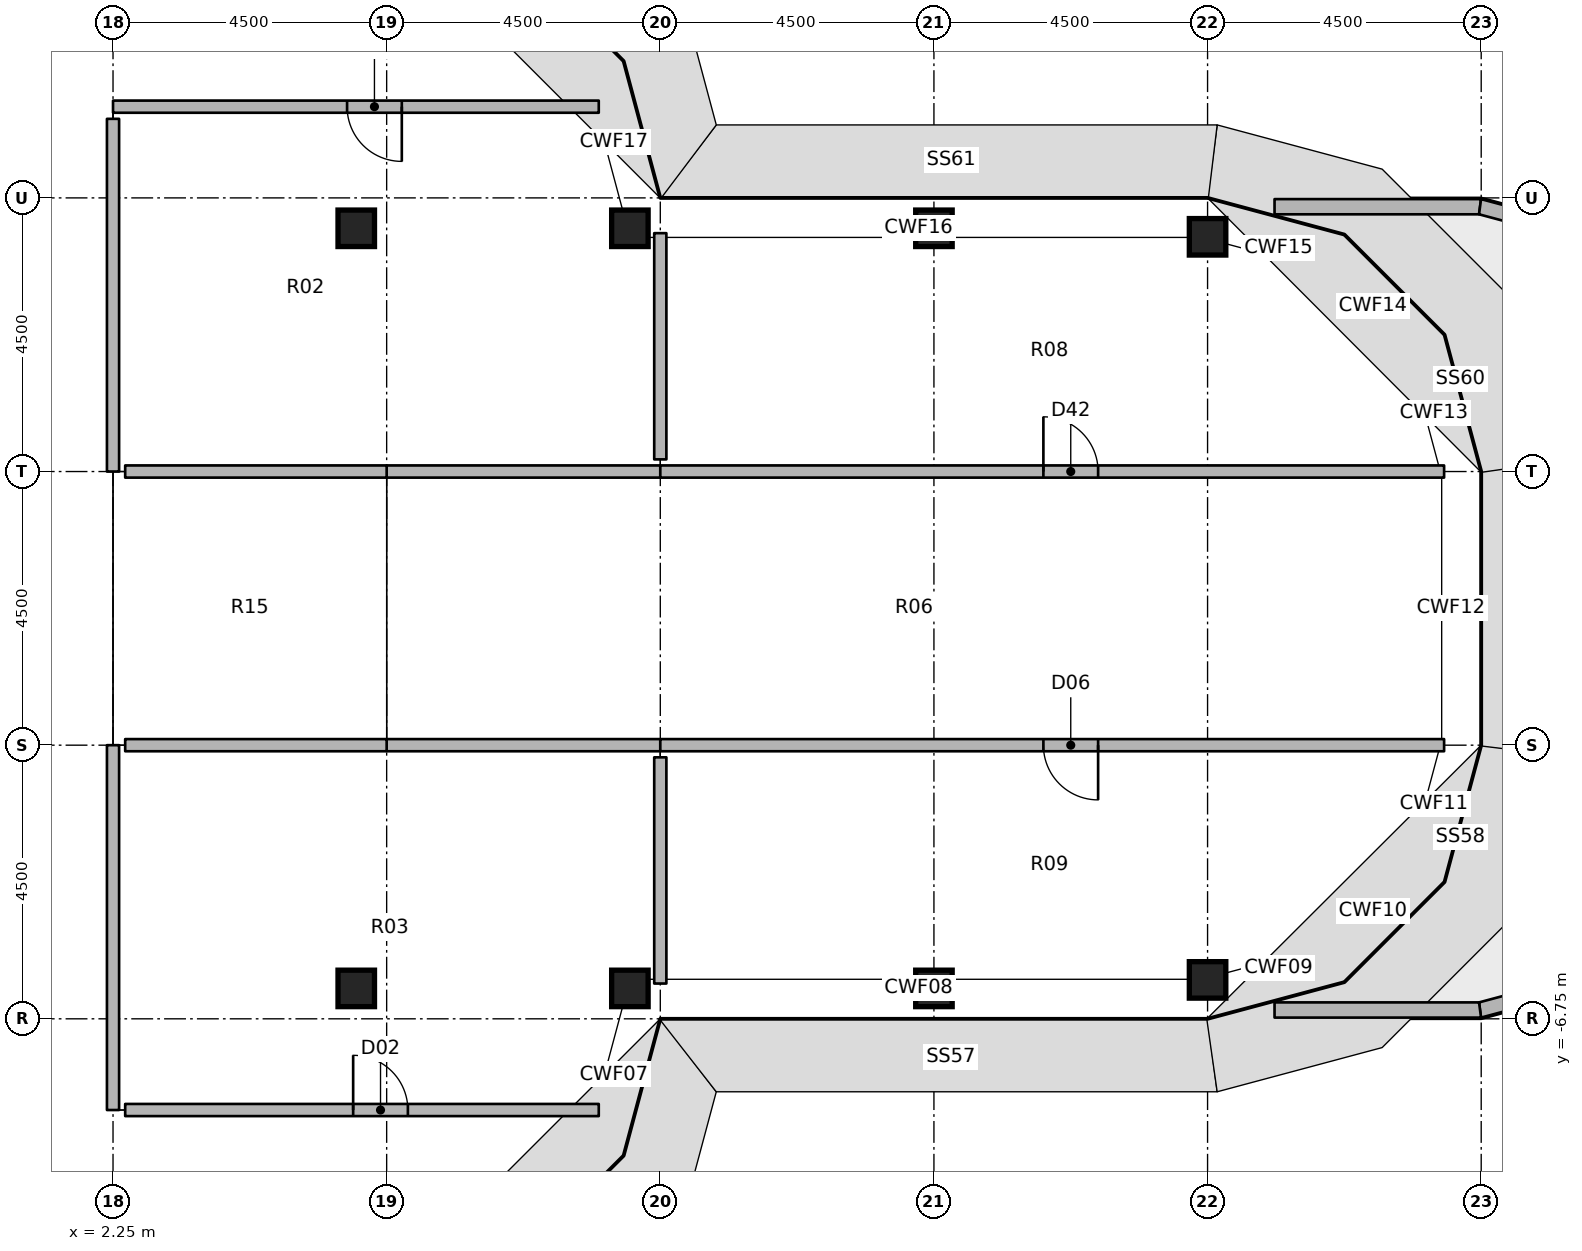
"""IFC4 building model, lengths in metres.
Left out: names, types, materials, properties, quantities, classifications, styles, units other than length and angle.
Written with IfcOpenShell. Run it as: python <this file> out.ifc"""

import sys

from ifc_helpers import new_model, si_unit, direction, frame, frame_2d, origin, origin_2d, place, context, subcontext, project, spatial, polyline, rectangle, outline, extrude, element, fill, save


model = new_model("IFC4")
c1 = context("Model", 3, precision=1e-05, world=origin(), true_north=direction((0.0, 1.0)))
c2 = subcontext(c1, "Body", "Model", "MODEL_VIEW")
j1 = project(units=[si_unit("LENGTHUNIT", "METRE"), si_unit("PLANEANGLEUNIT", "RADIAN")], contexts=[c1])
p1 = place(None, origin())
s1 = spatial("IfcSite", under=j1, at=p1, CompositionType="ELEMENT")
p2 = place(p1, origin())
s2 = spatial("IfcBuilding", under=s1, at=p2, CompositionType="ELEMENT")
p3 = place(p2, frame((0.0, 0.0, 291.6)))
s3 = spatial("IfcBuildingStorey", under=s2, at=p3, CompositionType="ELEMENT", Elevation=291.6)
for number, where, z_axis, x_axis in (
    (1, (6.25, -6.25, 0.0), (0.0, 0.0, 1.0), (1.0, 0.0, 0.0)),
    (2, (6.25, 6.25, 0.0), (0.0, 0.0, 1.0), (1.0, 0.0, 0.0)),
    (3, (10.75, -6.25, 0.0), (0.0, 0.0, 1.0), (1.0, 0.0, 0.0)),
    (4, (10.75, 6.25, 0.0), (0.0, 0.0, 1.0), (1.0, 0.0, 0.0)),
    (5, (15.75, -6.25, 0.0), (0.0, 0.0, 1.0), (1.0, 0.0, 0.0)),
    (6, (15.75, 6.25, 0.0), (0.0, 0.0, 1.0), (1.0, 0.0, 0.0)),
    (7, (20.25, -6.11, 0.0), (0.0, 0.0, 1.0), (1.0, 0.0, 0.0)),
    (8, (20.25, 6.11, 0.0), (0.0, 0.0, 1.0), (1.0, 0.0, 0.0)),
):
    element("IfcColumn", number, at=place(p3, frame(where, z_axis=z_axis, x_axis=x_axis)), inside=s3, PredefinedType="COLUMN", context=c2, shape_type="SweptSolid", body=[
        extrude(rectangle(XDim=0.6, YDim=0.6, at=origin_2d()), origin(), (0.0, 0.0, 1.0), 3.45),
    ])
p4 = place(p3, origin())
e9 = element("IfcWall", 9, at=p4, inside=s3, PredefinedType="PARAPET", context=c2, shape_type="SweptSolid", body=[
    extrude(outline(polyline([(21.351, 6.73), (24.747, 6.73), (24.715, 6.48), (21.351, 6.48), (21.351, 6.73)])), origin(), (0.0, 0.0, 1.0), 1.22),
])
p5 = place(p3, origin())
e10 = element("IfcWall", 10, at=p5, inside=s3, PredefinedType="PARAPET", context=c2, shape_type="SweptSolid", body=[
    extrude(outline(polyline([(24.747, 6.73), (26.99, 6.129), (26.86, 5.905), (24.715, 6.48), (24.747, 6.73)])), origin(), (0.0, 0.0, 1.0), 1.22),
])
p6 = place(p3, origin())
e11 = element("IfcWall", 11, at=p6, inside=s3, PredefinedType="PARAPET", context=c2, shape_type="SweptSolid", body=[
    extrude(outline(polyline([(26.99, -6.129), (24.747, -6.73), (24.715, -6.48), (26.86, -5.905), (26.99, -6.129)])), origin(), (0.0, 0.0, 1.0), 1.22),
])
p7 = place(p3, origin())
e12 = element("IfcWall", 12, at=p7, inside=s3, PredefinedType="PARAPET", context=c2, shape_type="SweptSolid", body=[
    extrude(outline(polyline([(24.747, -6.73), (21.351, -6.73), (21.351, -6.48), (24.715, -6.48), (24.747, -6.73)])), origin(), (0.0, 0.0, 1.0), 1.22),
])
p8 = place(p3, frame((10.238, 8.25, 0.0), z_axis=(0.0, 0.0, 1.0), x_axis=(-1.0, 0.0, 0.0)))
e13 = element("IfcWall", 13, at=p8, inside=s3, PredefinedType="PARTITIONING", context=c2, shape_type="SweptSolid", body=[
    extrude(rectangle(XDim=7.988, YDim=0.2, at=frame_2d((3.994, 0.0))), origin(), (0.0, 0.0, 1.0), 3.45),
])
p9 = place(p8, frame((3.239, 0.0, 0.0)))
e14 = element("IfcOpeningElement", 14, at=p9, cuts=e13, PredefinedType="OPENING", context=c2, shape_type="SweptSolid", body=[
    extrude(rectangle(XDim=0.9, YDim=2.1, at=frame_2d((0.45, 1.05))), frame((0.0, 0.11, 0.0), z_axis=(0.0, -1.0, 0.0), x_axis=(1.0, 0.0, 0.0)), (0.0, 0.0, 1.0), 0.22),
])
p10 = place(p3, frame((2.25, 8.05, 0.0), z_axis=(0.0, 0.0, 1.0), x_axis=(0.0, -1.0, 0.0)))
e15 = element("IfcWall", 15, at=p10, inside=s3, PredefinedType="PARTITIONING", context=c2, shape_type="SweptSolid", body=[
    extrude(rectangle(XDim=5.8, YDim=0.2, at=frame_2d((2.9, 0.0))), origin(), (0.0, 0.0, 1.0), 2.681),
])
p11 = place(p3, frame((2.25, -2.25, 0.0), z_axis=(0.0, 0.0, 1.0), x_axis=(0.0, -1.0, 0.0)))
e16 = element("IfcWall", 16, at=p11, inside=s3, PredefinedType="PARTITIONING", context=c2, shape_type="SweptSolid", body=[
    extrude(rectangle(XDim=6.0, YDim=0.2, at=frame_2d((3.0, 0.0))), origin(), (0.0, 0.0, 1.0), 2.681),
])
p12 = place(p3, frame((2.45, -8.25, 0.0), z_axis=(0.0, 0.0, 1.0), x_axis=(1.0, 0.0, 0.0)))
e17 = element("IfcWall", 17, at=p12, inside=s3, PredefinedType="PARTITIONING", context=c2, shape_type="SweptSolid", body=[
    extrude(rectangle(XDim=7.788, YDim=0.2, at=frame_2d((3.894, 0.0))), origin(), (0.0, 0.0, 1.0), 3.45),
])
p13 = place(p12, frame((3.749, 0.0, 0.0)))
e18 = element("IfcOpeningElement", 18, at=p13, cuts=e17, PredefinedType="OPENING", context=c2, shape_type="SweptSolid", body=[
    extrude(rectangle(XDim=0.9, YDim=2.1, at=frame_2d((0.45, 1.05))), frame((0.0, 0.11, 0.0), z_axis=(0.0, -1.0, 0.0), x_axis=(1.0, 0.0, 0.0)), (0.0, 0.0, 1.0), 0.22),
])
p14 = place(p3, frame((11.25, 2.25, 0.0), z_axis=(0.0, 0.0, 1.0), x_axis=(-1.0, 0.0, 0.0)))
e19 = element("IfcWall", 19, at=p14, inside=s3, PredefinedType="PARTITIONING", context=c2, shape_type="SweptSolid", body=[
    extrude(rectangle(XDim=4.5, YDim=0.2, at=frame_2d((2.25, 0.0))), origin(), (0.0, 0.0, 1.0), 2.828),
])
p15 = place(p3, frame((11.25, 6.17, 0.0), z_axis=(0.0, 0.0, 1.0), x_axis=(0.0, -1.0, 0.0)))
e20 = element("IfcWall", 20, at=p15, inside=s3, PredefinedType="PARTITIONING", context=c2, shape_type="SweptSolid", body=[
    extrude(rectangle(XDim=3.72, YDim=0.2, at=frame_2d((1.86, 0.0))), origin(), (0.0, 0.0, 1.0), 3.45),
])
p16 = place(p3, frame((6.75, 2.25, 0.0), z_axis=(0.0, 0.0, 1.0), x_axis=(-1.0, 0.0, 0.0)))
e21 = element("IfcWall", 21, at=p16, inside=s3, PredefinedType="PARTITIONING", context=c2, shape_type="SweptSolid", body=[
    extrude(rectangle(XDim=4.3, YDim=0.2, at=frame_2d((2.15, 0.0))), origin(), (0.0, 0.0, 1.0), 2.828),
])
p17 = place(p3, frame((6.75, -2.25, 0.0), z_axis=(0.0, 0.0, 1.0), x_axis=(1.0, 0.0, 0.0)))
e22 = element("IfcWall", 22, at=p17, inside=s3, PredefinedType="PARTITIONING", context=c2, shape_type="SweptSolid", body=[
    extrude(rectangle(XDim=4.5, YDim=0.2, at=frame_2d((2.25, 0.0))), origin(), (0.0, 0.0, 1.0), 2.828),
])
p18 = place(p3, frame((11.25, -2.45, 0.0), z_axis=(0.0, 0.0, 1.0), x_axis=(0.0, -1.0, 0.0)))
e23 = element("IfcWall", 23, at=p18, inside=s3, PredefinedType="PARTITIONING", context=c2, shape_type="SweptSolid", body=[
    extrude(rectangle(XDim=3.72, YDim=0.2, at=frame_2d((1.86, 0.0))), origin(), (0.0, 0.0, 1.0), 3.45),
])
p19 = place(p3, frame((2.45, -2.25, 0.0), z_axis=(0.0, 0.0, 1.0), x_axis=(1.0, 0.0, 0.0)))
e24 = element("IfcWall", 24, at=p19, inside=s3, PredefinedType="PARTITIONING", context=c2, shape_type="SweptSolid", body=[
    extrude(rectangle(XDim=4.3, YDim=0.2, at=frame_2d((2.15, 0.0))), origin(), (0.0, 0.0, 1.0), 2.828),
])
p20 = place(p3, frame((11.25, 2.25, 0.0), z_axis=(0.0, 0.0, 1.0), x_axis=(1.0, 0.0, 0.0)))
e25 = element("IfcWall", 25, at=p20, inside=s3, PredefinedType="PARTITIONING", context=c2, shape_type="SweptSolid", body=[
    extrude(rectangle(XDim=12.89, YDim=0.2, at=frame_2d((6.445, 0.0))), origin(), (0.0, 0.0, 1.0), 2.53),
])
p21 = place(p20, frame((6.3, 0.0, 0.0)))
e26 = element("IfcOpeningElement", 26, at=p21, cuts=e25, PredefinedType="OPENING", context=c2, shape_type="SweptSolid", body=[
    extrude(rectangle(XDim=0.9, YDim=2.1, at=frame_2d((0.45, 1.05))), frame((0.0, 0.11, 0.0), z_axis=(0.0, -1.0, 0.0), x_axis=(1.0, 0.0, 0.0)), (0.0, 0.0, 1.0), 0.22),
])
p22 = place(p3, frame((24.14, -2.25, 0.0), z_axis=(0.0, 0.0, 1.0), x_axis=(-1.0, 0.0, 0.0)))
e27 = element("IfcWall", 27, at=p22, inside=s3, PredefinedType="PARTITIONING", context=c2, shape_type="SweptSolid", body=[
    extrude(rectangle(XDim=12.89, YDim=0.2, at=frame_2d((6.445, 0.0))), origin(), (0.0, 0.0, 1.0), 2.53),
])
p23 = place(p22, frame((5.69, 0.0, 0.0)))
e28 = element("IfcOpeningElement", 28, at=p23, cuts=e27, PredefinedType="OPENING", context=c2, shape_type="SweptSolid", body=[
    extrude(rectangle(XDim=0.9, YDim=2.1, at=frame_2d((0.45, 1.05))), frame((0.0, 0.11, 0.0), z_axis=(0.0, -1.0, 0.0), x_axis=(1.0, 0.0, 0.0)), (0.0, 0.0, 1.0), 0.22),
])
p24 = place(p9, origin())
e29 = element("IfcDoor", 29, at=p24, inside=s3, OperationType="SINGLE_SWING_LEFT", PredefinedType="DOOR", context=c2, shape_type="SweptSolid", body=[
    extrude(rectangle(XDim=0.9, YDim=2.1, at=frame_2d((0.45, 1.05))), frame((0.0, 0.025, 0.0), z_axis=(0.0, -1.0, 0.0), x_axis=(1.0, 0.0, 0.0)), (0.0, 0.0, 1.0), 0.05),
])
fill(e14, e29)
p25 = place(p13, origin())
e30 = element("IfcDoor", 30, at=p25, inside=s3, OperationType="SINGLE_SWING_LEFT", PredefinedType="DOOR", context=c2, shape_type="SweptSolid", body=[
    extrude(rectangle(XDim=0.9, YDim=2.1, at=frame_2d((0.45, 1.05))), frame((0.0, 0.025, 0.0), z_axis=(0.0, -1.0, 0.0), x_axis=(1.0, 0.0, 0.0)), (0.0, 0.0, 1.0), 0.05),
])
fill(e18, e30)
p26 = place(p21, origin())
e31 = element("IfcDoor", 31, at=p26, inside=s3, OperationType="SINGLE_SWING_LEFT", PredefinedType="DOOR", context=c2, shape_type="SweptSolid", body=[
    extrude(rectangle(XDim=0.9, YDim=2.1, at=frame_2d((0.45, 1.05))), frame((0.0, 0.025, 0.0), z_axis=(0.0, -1.0, 0.0), x_axis=(1.0, 0.0, 0.0)), (0.0, 0.0, 1.0), 0.05),
])
fill(e26, e31)
p27 = place(p23, origin())
e32 = element("IfcDoor", 32, at=p27, inside=s3, OperationType="SINGLE_SWING_LEFT", PredefinedType="DOOR", context=c2, shape_type="SweptSolid", body=[
    extrude(rectangle(XDim=0.9, YDim=2.1, at=frame_2d((0.45, 1.05))), frame((0.0, 0.025, 0.0), z_axis=(0.0, -1.0, 0.0), x_axis=(1.0, 0.0, 0.0)), (0.0, 0.0, 1.0), 0.05),
])
fill(e28, e32)
save(model, sys.argv[1])
